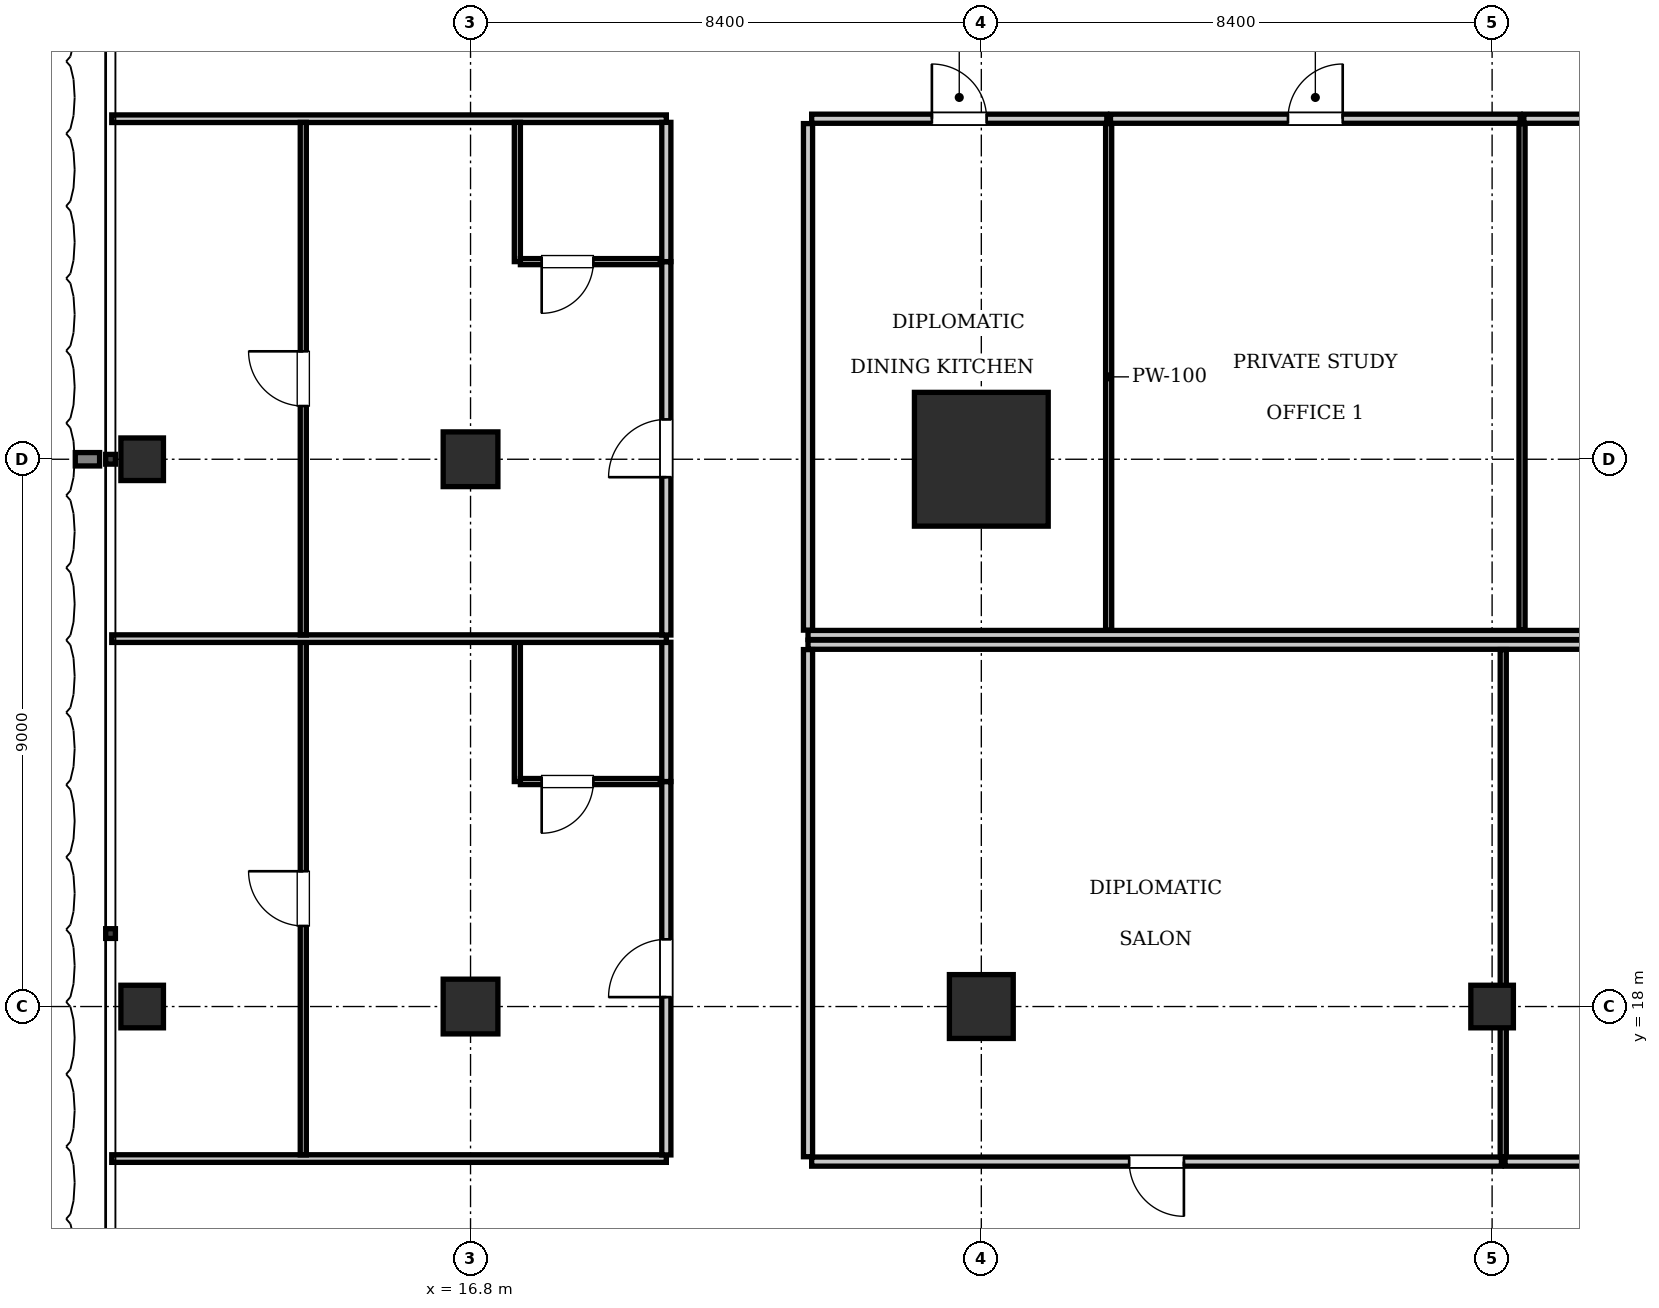
"""IFC4 building model, lengths in metres.
Left out: names, types, materials, properties, quantities, classifications, styles, units other than length and angle.
Written with IfcOpenShell. Run it as: python <this file> out.ifc"""

import sys

from ifc_helpers import new_model, si_unit, direction, frame, frame_2d, origin, origin_2d, place, context, subcontext, project, spatial, rectangle, i_section, extrude, element, fill, save


model = new_model("IFC4")
c1 = context("Model", 3, precision=1e-05, world=origin(), true_north=direction((0.0, 1.0)))
c2 = subcontext(c1, "Body", "Model", "MODEL_VIEW")
j1 = project(units=[si_unit("LENGTHUNIT", "METRE"), si_unit("PLANEANGLEUNIT", "RADIAN")], contexts=[c1])
p1 = place(None, origin())
s1 = spatial("IfcSite", under=j1, at=p1, CompositionType="ELEMENT")
p2 = place(p1, origin())
s2 = spatial("IfcBuilding", under=s1, at=p2, CompositionType="ELEMENT")
p3 = place(p2, frame((0.0, 0.0, 69.3)))
s3 = spatial("IfcBuildingStorey", under=s2, at=p3, CompositionType="ELEMENT", Elevation=69.3)
p4 = place(p3, frame((25.2, 27.0, 0.0), z_axis=(0.0, 0.0, 1.0), x_axis=(1.0, 0.0, 0.0)))
e1 = element("IfcColumn", 1, at=p4, inside=s3, PredefinedType="COLUMN", context=c2, shape_type="SweptSolid", body=[
    extrude(rectangle(XDim=2.2, YDim=2.2, at=origin_2d()), origin(), (0.0, 0.0, 1.0), 3.85),
])
p5 = place(p3, frame((25.2, 18.0, 0.0), z_axis=(0.0, 0.0, 1.0), x_axis=(1.0, 0.0, 0.0)))
e2 = element("IfcColumn", 2, at=p5, inside=s3, PredefinedType="COLUMN", context=c2, shape_type="SweptSolid", body=[
    extrude(rectangle(XDim=1.05, YDim=1.05, at=origin_2d()), origin(), (0.0, 0.0, 1.0), 3.85),
])
p6 = place(p3, frame((33.6, 18.0, 0.0), z_axis=(0.0, 0.0, 1.0), x_axis=(1.0, 0.0, 0.0)))
e3 = element("IfcColumn", 3, at=p6, inside=s3, PredefinedType="COLUMN", context=c2, shape_type="SweptSolid", body=[
    extrude(i_section(OverallWidth=0.7, OverallDepth=0.7, WebThickness=0.028, FlangeThickness=0.044, at=origin_2d()), origin(), (0.0, 0.0, 1.0), 3.85),
])
for number, where, z_axis, x_axis in (
    (4, (16.8, 18.0, 0.0), (0.0, 0.0, 1.0), (1.0, 0.0, 0.0)),
    (5, (16.8, 27.0, 0.0), (0.0, 0.0, 1.0), (1.0, 0.0, 0.0)),
):
    element("IfcColumn", number, at=place(p3, frame(where, z_axis=z_axis, x_axis=x_axis)), inside=s3, PredefinedType="COLUMN", context=c2, shape_type="SweptSolid", body=[
        extrude(rectangle(XDim=0.9, YDim=0.9, at=origin_2d()), origin(), (0.0, 0.0, 1.0), 3.85),
    ])
for number, where, z_axis, x_axis in (
    (6, (11.4, 18.0, 0.0), (0.0, 0.0, 1.0), (1.0, 0.0, 0.0)),
    (7, (11.4, 27.0, 0.0), (0.0, 0.0, 1.0), (1.0, 0.0, 0.0)),
):
    element("IfcColumn", number, at=place(p3, frame(where, z_axis=z_axis, x_axis=x_axis)), inside=s3, PredefinedType="COLUMN", context=c2, shape_type="SweptSolid", body=[
        extrude(i_section(OverallWidth=0.7, OverallDepth=0.7, WebThickness=0.028, FlangeThickness=0.044, at=origin_2d()), origin(), (0.0, 0.0, 1.0), 3.85),
    ])
p7 = place(p3, frame((22.35, 24.11, 0.0), z_axis=(0.0, 0.0, 1.0), x_axis=(1.0, 0.0, 0.0)))
e8 = element("IfcWall", 8, at=p7, inside=s3, PredefinedType="PARTITIONING", context=c2, shape_type="SweptSolid", body=[
    extrude(rectangle(XDim=30.9, YDim=0.15, at=frame_2d((15.45, 0.0))), origin(), (0.0, 0.0, 1.0), 3.61),
])
p8 = place(p3, frame((22.35, 24.19, 0.0), z_axis=(0.0, 0.0, 1.0), x_axis=(0.0, 1.0, 0.0)))
e9 = element("IfcWall", 9, at=p8, inside=s3, PredefinedType="PARTITIONING", context=c2, shape_type="SweptSolid", body=[
    extrude(rectangle(XDim=8.33, YDim=0.15, at=frame_2d((4.165, 0.0))), origin(), (0.0, 0.0, 1.0), 3.61),
])
p9 = place(p3, frame((22.41, 32.6, 0.0), z_axis=(0.0, 0.0, 1.0), x_axis=(1.0, 0.0, 0.0)))
e10 = element("IfcWall", 10, at=p9, inside=s3, PredefinedType="PARTITIONING", context=c2, shape_type="SweptSolid", body=[
    extrude(rectangle(XDim=4.854, YDim=0.15, at=frame_2d((2.427, 0.0))), origin(), (0.0, 0.0, 1.0), 3.61),
])
p10 = place(p9, frame((1.977, 0.0, 0.0)))
e11 = element("IfcOpeningElement", 11, at=p10, cuts=e10, PredefinedType="OPENING", context=c2, shape_type="SweptSolid", body=[
    extrude(rectangle(XDim=0.9, YDim=2.1, at=frame_2d((0.45, 1.05))), frame((0.0, 0.085, 0.0), z_axis=(0.0, -1.0, 0.0), x_axis=(1.0, 0.0, 0.0)), (0.0, 0.0, 1.0), 0.17),
])
p11 = place(p3, frame((27.294, 24.19, 0.0), z_axis=(0.0, 0.0, 1.0), x_axis=(0.0, 1.0, 0.0)))
e12 = element("IfcWall", 12, at=p11, inside=s3, PredefinedType="PARTITIONING", context=c2, shape_type="SweptSolid", body=[
    extrude(rectangle(XDim=8.33, YDim=0.1, at=frame_2d((4.165, 0.0))), origin(), (0.0, 0.0, 1.0), 3.61),
])
p12 = place(p3, frame((27.324, 32.6, 0.0), z_axis=(0.0, 0.0, 1.0), x_axis=(1.0, 0.0, 0.0)))
e13 = element("IfcWall", 13, at=p12, inside=s3, PredefinedType="PARTITIONING", context=c2, shape_type="SweptSolid", body=[
    extrude(rectangle(XDim=6.738, YDim=0.15, at=frame_2d((3.369, 0.0))), origin(), (0.0, 0.0, 1.0), 3.61),
])
p13 = place(p12, frame((2.919, 0.0, 0.0)))
e14 = element("IfcOpeningElement", 14, at=p13, cuts=e13, PredefinedType="OPENING", context=c2, shape_type="SweptSolid", body=[
    extrude(rectangle(XDim=0.9, YDim=2.1, at=frame_2d((0.45, 1.05))), frame((0.0, 0.085, 0.0), z_axis=(0.0, -1.0, 0.0), x_axis=(1.0, 0.0, 0.0)), (0.0, 0.0, 1.0), 0.17),
])
p14 = place(p3, frame((34.092, 24.19, 0.0), z_axis=(0.0, 0.0, 1.0), x_axis=(0.0, 1.0, 0.0)))
e15 = element("IfcWall", 15, at=p14, inside=s3, PredefinedType="PARTITIONING", context=c2, shape_type="SweptSolid", body=[
    extrude(rectangle(XDim=8.33, YDim=0.1, at=frame_2d((4.165, 0.0))), origin(), (0.0, 0.0, 1.0), 3.61),
])
p15 = place(p3, frame((34.122, 32.6, 0.0), z_axis=(0.0, 0.0, 1.0), x_axis=(1.0, 0.0, 0.0)))
e16 = element("IfcWall", 16, at=p15, inside=s3, PredefinedType="PARTITIONING", context=c2, shape_type="SweptSolid", body=[
    extrude(rectangle(XDim=8.592, YDim=0.15, at=frame_2d((4.296, 0.0))), origin(), (0.0, 0.0, 1.0), 3.61),
])
p16 = place(p15, frame((3.846, 0.0, 0.0)))
e17 = element("IfcOpeningElement", 17, at=p16, cuts=e16, PredefinedType="OPENING", context=c2, shape_type="SweptSolid", body=[
    extrude(rectangle(XDim=0.9, YDim=2.1, at=frame_2d((0.45, 1.05))), frame((0.0, 0.085, 0.0), z_axis=(0.0, -1.0, 0.0), x_axis=(1.0, 0.0, 0.0)), (0.0, 0.0, 1.0), 0.17),
])
p17 = place(p3, frame((22.35, 23.95, 0.0), z_axis=(0.0, 0.0, 1.0), x_axis=(1.0, 0.0, 0.0)))
e18 = element("IfcWall", 18, at=p17, inside=s3, PredefinedType="PARTITIONING", context=c2, shape_type="SweptSolid", body=[
    extrude(rectangle(XDim=30.9, YDim=0.15, at=frame_2d((15.45, 0.0))), origin(), (0.0, 0.0, 1.0), 3.61),
])
p18 = place(p3, frame((22.35, 15.53, 0.0), z_axis=(0.0, 0.0, 1.0), x_axis=(0.0, 1.0, 0.0)))
e19 = element("IfcWall", 19, at=p18, inside=s3, PredefinedType="PARTITIONING", context=c2, shape_type="SweptSolid", body=[
    extrude(rectangle(XDim=8.34, YDim=0.15, at=frame_2d((4.17, 0.0))), origin(), (0.0, 0.0, 1.0), 3.61),
])
p19 = place(p3, frame((22.41, 15.45, 0.0), z_axis=(0.0, 0.0, 1.0), x_axis=(1.0, 0.0, 0.0)))
e20 = element("IfcWall", 20, at=p19, inside=s3, PredefinedType="PARTITIONING", context=c2, shape_type="SweptSolid", body=[
    extrude(rectangle(XDim=11.343, YDim=0.15, at=frame_2d((5.671, 0.0))), origin(), (0.0, 0.0, 1.0), 3.61),
])
p20 = place(p19, frame((5.221, 0.0, 0.0)))
e21 = element("IfcOpeningElement", 21, at=p20, cuts=e20, PredefinedType="OPENING", context=c2, shape_type="SweptSolid", body=[
    extrude(rectangle(XDim=0.9, YDim=2.1, at=frame_2d((0.45, 1.05))), frame((0.0, 0.085, 0.0), z_axis=(0.0, -1.0, 0.0), x_axis=(1.0, 0.0, 0.0)), (0.0, 0.0, 1.0), 0.17),
])
p21 = place(p3, frame((33.783, 15.53, 0.0), z_axis=(0.0, 0.0, 1.0), x_axis=(0.0, 1.0, 0.0)))
e22 = element("IfcWall", 22, at=p21, inside=s3, PredefinedType="PARTITIONING", context=c2, shape_type="SweptSolid", body=[
    extrude(rectangle(XDim=8.34, YDim=0.1, at=frame_2d((4.17, 0.0))), origin(), (0.0, 0.0, 1.0), 2.988),
])
p22 = place(p3, frame((33.813, 15.45, 0.0), z_axis=(0.0, 0.0, 1.0), x_axis=(1.0, 0.0, 0.0)))
e23 = element("IfcWall", 23, at=p22, inside=s3, PredefinedType="PARTITIONING", context=c2, shape_type="SweptSolid", body=[
    extrude(rectangle(XDim=19.377, YDim=0.15, at=frame_2d((9.688, 0.0))), origin(), (0.0, 0.0, 1.0), 3.61),
])
p23 = place(p22, frame((9.239, 0.0, 0.0)))
e24 = element("IfcOpeningElement", 24, at=p23, cuts=e23, PredefinedType="OPENING", context=c2, shape_type="SweptSolid", body=[
    extrude(rectangle(XDim=0.9, YDim=2.1, at=frame_2d((0.45, 1.05))), frame((0.0, 0.085, 0.0), z_axis=(0.0, -1.0, 0.0), x_axis=(1.0, 0.0, 0.0)), (0.0, 0.0, 1.0), 0.17),
])
for number, where, z_axis, x_axis in (
    (25, (10.9, 15.5, 0.0), (0.0, 0.0, 1.0), (1.0, 0.0, 0.0)),
    (26, (10.9, 32.6, 0.0), (0.0, 0.0, 1.0), (1.0, 0.0, 0.0)),
):
    element("IfcWall", number, at=place(p3, frame(where, z_axis=z_axis, x_axis=x_axis)), inside=s3, PredefinedType="PARTITIONING", context=c2, shape_type="SweptSolid", body=[
        extrude(rectangle(XDim=9.12, YDim=0.125, at=frame_2d((4.56, 0.0))), origin(), (0.0, 0.0, 1.0), 3.61),
    ])
p24 = place(p3, frame((20.02, 15.56, 0.0), z_axis=(0.0, 0.0, 1.0), x_axis=(0.0, 1.0, 0.0)))
e27 = element("IfcWall", 27, at=p24, inside=s3, PredefinedType="PARTITIONING", context=c2, shape_type="SweptSolid", body=[
    extrude(rectangle(XDim=6.14, YDim=0.15, at=frame_2d((3.07, 0.0))), origin(), (0.0, 0.0, 1.0), 3.61),
])
p25 = place(p24, frame((2.595, 0.0, 0.0)))
e28 = element("IfcOpeningElement", 28, at=p25, cuts=e27, PredefinedType="OPENING", context=c2, shape_type="SweptSolid", body=[
    extrude(rectangle(XDim=0.95, YDim=2.15, at=frame_2d((0.475, 1.075))), frame((0.0, 0.085, 0.0), z_axis=(0.0, -1.0, 0.0), x_axis=(1.0, 0.0, 0.0)), (0.0, 0.0, 1.0), 0.17),
])
p26 = place(p3, frame((20.02, 21.7, 0.0), z_axis=(0.0, 0.0, 1.0), x_axis=(0.0, 1.0, 0.0)))
e29 = element("IfcWall", 29, at=p26, inside=s3, PredefinedType="PARTITIONING", context=c2, shape_type="SweptSolid", body=[
    extrude(rectangle(XDim=2.29, YDim=0.15, at=frame_2d((1.145, 0.0))), origin(), (0.0, 0.0, 1.0), 3.61),
])
p27 = place(p3, frame((17.57, 21.7, 0.0), z_axis=(0.0, 0.0, 1.0), x_axis=(0.0, 1.0, 0.0)))
e30 = element("IfcWall", 30, at=p27, inside=s3, PredefinedType="PARTITIONING", context=c2, shape_type="SweptSolid", body=[
    extrude(rectangle(XDim=2.29, YDim=0.1, at=frame_2d((1.145, 0.0))), origin(), (0.0, 0.0, 1.0), 3.61),
])
p28 = place(p3, frame((17.62, 21.7, 0.0), z_axis=(0.0, 0.0, 1.0), x_axis=(1.0, 0.0, 0.0)))
e31 = element("IfcWall", 31, at=p28, inside=s3, PredefinedType="PARTITIONING", context=c2, shape_type="SweptSolid", body=[
    extrude(rectangle(XDim=2.3, YDim=0.1, at=frame_2d((1.15, 0.0))), origin(), (0.0, 0.0, 1.0), 3.61),
])
p29 = place(p28, frame((0.35, 0.0, 0.0)))
e32 = element("IfcOpeningElement", 32, at=p29, cuts=e31, PredefinedType="OPENING", context=c2, shape_type="SweptSolid", body=[
    extrude(rectangle(XDim=0.85, YDim=2.1, at=frame_2d((0.425, 1.05))), frame((0.0, 0.06, 0.0), z_axis=(0.0, -1.0, 0.0), x_axis=(1.0, 0.0, 0.0)), (0.0, 0.0, 1.0), 0.12),
])
p30 = place(p3, frame((14.05, 15.56, 0.0), z_axis=(0.0, 0.0, 1.0), x_axis=(0.0, 1.0, 0.0)))
e33 = element("IfcWall", 33, at=p30, inside=s3, PredefinedType="PARTITIONING", context=c2, shape_type="SweptSolid", body=[
    extrude(rectangle(XDim=8.43, YDim=0.1, at=frame_2d((4.215, 0.0))), origin(), (0.0, 0.0, 1.0), 3.403),
])
p31 = place(p30, frame((3.765, 0.0, 0.0)))
e34 = element("IfcOpeningElement", 34, at=p31, cuts=e33, PredefinedType="OPENING", context=c2, shape_type="SweptSolid", body=[
    extrude(rectangle(XDim=0.9, YDim=2.1, at=frame_2d((0.45, 1.05))), frame((0.0, 0.06, 0.0), z_axis=(0.0, -1.0, 0.0), x_axis=(1.0, 0.0, 0.0)), (0.0, 0.0, 1.0), 0.12),
])
p32 = place(p3, frame((10.9, 24.05, 0.0), z_axis=(0.0, 0.0, 1.0), x_axis=(1.0, 0.0, 0.0)))
e35 = element("IfcWall", 35, at=p32, inside=s3, PredefinedType="PARTITIONING", context=c2, shape_type="SweptSolid", body=[
    extrude(rectangle(XDim=9.12, YDim=0.125, at=frame_2d((4.56, 0.0))), origin(), (0.0, 0.0, 1.0), 3.61),
])
p33 = place(p3, frame((20.02, 24.11, 0.0), z_axis=(0.0, 0.0, 1.0), x_axis=(0.0, 1.0, 0.0)))
e36 = element("IfcWall", 36, at=p33, inside=s3, PredefinedType="PARTITIONING", context=c2, shape_type="SweptSolid", body=[
    extrude(rectangle(XDim=6.14, YDim=0.15, at=frame_2d((3.07, 0.0))), origin(), (0.0, 0.0, 1.0), 3.61),
])
p34 = place(p33, frame((2.595, 0.0, 0.0)))
e37 = element("IfcOpeningElement", 37, at=p34, cuts=e36, PredefinedType="OPENING", context=c2, shape_type="SweptSolid", body=[
    extrude(rectangle(XDim=0.95, YDim=2.15, at=frame_2d((0.475, 1.075))), frame((0.0, 0.085, 0.0), z_axis=(0.0, -1.0, 0.0), x_axis=(1.0, 0.0, 0.0)), (0.0, 0.0, 1.0), 0.17),
])
p35 = place(p3, frame((20.02, 30.25, 0.0), z_axis=(0.0, 0.0, 1.0), x_axis=(0.0, 1.0, 0.0)))
e38 = element("IfcWall", 38, at=p35, inside=s3, PredefinedType="PARTITIONING", context=c2, shape_type="SweptSolid", body=[
    extrude(rectangle(XDim=2.29, YDim=0.15, at=frame_2d((1.145, 0.0))), origin(), (0.0, 0.0, 1.0), 3.61),
])
p36 = place(p3, frame((17.57, 30.25, 0.0), z_axis=(0.0, 0.0, 1.0), x_axis=(0.0, 1.0, 0.0)))
e39 = element("IfcWall", 39, at=p36, inside=s3, PredefinedType="PARTITIONING", context=c2, shape_type="SweptSolid", body=[
    extrude(rectangle(XDim=2.29, YDim=0.1, at=frame_2d((1.145, 0.0))), origin(), (0.0, 0.0, 1.0), 3.61),
])
p37 = place(p3, frame((17.62, 30.25, 0.0), z_axis=(0.0, 0.0, 1.0), x_axis=(1.0, 0.0, 0.0)))
e40 = element("IfcWall", 40, at=p37, inside=s3, PredefinedType="PARTITIONING", context=c2, shape_type="SweptSolid", body=[
    extrude(rectangle(XDim=2.3, YDim=0.1, at=frame_2d((1.15, 0.0))), origin(), (0.0, 0.0, 1.0), 3.61),
])
p38 = place(p37, frame((0.35, 0.0, 0.0)))
e41 = element("IfcOpeningElement", 41, at=p38, cuts=e40, PredefinedType="OPENING", context=c2, shape_type="SweptSolid", body=[
    extrude(rectangle(XDim=0.85, YDim=2.1, at=frame_2d((0.425, 1.05))), frame((0.0, 0.06, 0.0), z_axis=(0.0, -1.0, 0.0), x_axis=(1.0, 0.0, 0.0)), (0.0, 0.0, 1.0), 0.12),
])
p39 = place(p3, frame((14.05, 24.11, 0.0), z_axis=(0.0, 0.0, 1.0), x_axis=(0.0, 1.0, 0.0)))
e42 = element("IfcWall", 42, at=p39, inside=s3, PredefinedType="PARTITIONING", context=c2, shape_type="SweptSolid", body=[
    extrude(rectangle(XDim=8.43, YDim=0.1, at=frame_2d((4.215, 0.0))), origin(), (0.0, 0.0, 1.0), 3.207),
])
p40 = place(p39, frame((3.765, 0.0, 0.0)))
e43 = element("IfcOpeningElement", 43, at=p40, cuts=e42, PredefinedType="OPENING", context=c2, shape_type="SweptSolid", body=[
    extrude(rectangle(XDim=0.9, YDim=2.1, at=frame_2d((0.45, 1.05))), frame((0.0, 0.06, 0.0), z_axis=(0.0, -1.0, 0.0), x_axis=(1.0, 0.0, 0.0)), (0.0, 0.0, 1.0), 0.12),
])
p41 = place(p10, origin())
e44 = element("IfcDoor", 44, at=p41, inside=s3, OperationType="SINGLE_SWING_LEFT", PredefinedType="DOOR", context=c2, shape_type="SweptSolid", body=[
    extrude(rectangle(XDim=0.9, YDim=2.1, at=frame_2d((0.45, 1.05))), frame((0.0, 0.025, 0.0), z_axis=(0.0, -1.0, 0.0), x_axis=(1.0, 0.0, 0.0)), (0.0, 0.0, 1.0), 0.05),
])
fill(e11, e44)
p42 = place(p13, origin())
e45 = element("IfcDoor", 45, at=p42, inside=s3, OperationType="SINGLE_SWING_RIGHT", PredefinedType="DOOR", context=c2, shape_type="SweptSolid", body=[
    extrude(rectangle(XDim=0.9, YDim=2.1, at=frame_2d((0.45, 1.05))), frame((0.0, 0.025, 0.0), z_axis=(0.0, -1.0, 0.0), x_axis=(1.0, 0.0, 0.0)), (0.0, 0.0, 1.0), 0.05),
])
fill(e14, e45)
p43 = place(p20, frame((0.9, 0.0, 0.0), z_axis=(0.0, 0.0, 1.0), x_axis=(-1.0, 0.0, 0.0)))
e46 = element("IfcDoor", 46, at=p43, inside=s3, OperationType="SINGLE_SWING_LEFT", PredefinedType="DOOR", context=c2, shape_type="SweptSolid", body=[
    extrude(rectangle(XDim=0.9, YDim=2.1, at=frame_2d((0.45, 1.05))), frame((0.0, 0.025, 0.0), z_axis=(0.0, -1.0, 0.0), x_axis=(1.0, 0.0, 0.0)), (0.0, 0.0, 1.0), 0.05),
])
fill(e21, e46)
p44 = place(p29, frame((0.85, 0.0, 0.0), z_axis=(0.0, 0.0, 1.0), x_axis=(-1.0, 0.0, 0.0)))
e47 = element("IfcDoor", 47, at=p44, inside=s3, OperationType="SINGLE_SWING_RIGHT", PredefinedType="DOOR", context=c2, shape_type="SweptSolid", body=[
    extrude(rectangle(XDim=0.85, YDim=2.1, at=frame_2d((0.425, 1.05))), frame((0.0, 0.025, 0.0), z_axis=(0.0, -1.0, 0.0), x_axis=(1.0, 0.0, 0.0)), (0.0, 0.0, 1.0), 0.05),
])
fill(e32, e47)
p45 = place(p25, origin())
e48 = element("IfcDoor", 48, at=p45, inside=s3, OperationType="SINGLE_SWING_LEFT", PredefinedType="DOOR", context=c2, shape_type="SweptSolid", body=[
    extrude(rectangle(XDim=0.95, YDim=2.15, at=frame_2d((0.475, 1.075))), frame((0.0, 0.025, 0.0), z_axis=(0.0, -1.0, 0.0), x_axis=(1.0, 0.0, 0.0)), (0.0, 0.0, 1.0), 0.05),
])
fill(e28, e48)
p46 = place(p31, origin())
e49 = element("IfcDoor", 49, at=p46, inside=s3, OperationType="SINGLE_SWING_RIGHT", PredefinedType="DOOR", context=c2, shape_type="SweptSolid", body=[
    extrude(rectangle(XDim=0.9, YDim=2.1, at=frame_2d((0.45, 1.05))), frame((0.0, 0.025, 0.0), z_axis=(0.0, -1.0, 0.0), x_axis=(1.0, 0.0, 0.0)), (0.0, 0.0, 1.0), 0.05),
])
fill(e34, e49)
p47 = place(p38, frame((0.85, 0.0, 0.0), z_axis=(0.0, 0.0, 1.0), x_axis=(-1.0, 0.0, 0.0)))
e50 = element("IfcDoor", 50, at=p47, inside=s3, OperationType="SINGLE_SWING_RIGHT", PredefinedType="DOOR", context=c2, shape_type="SweptSolid", body=[
    extrude(rectangle(XDim=0.85, YDim=2.1, at=frame_2d((0.425, 1.05))), frame((0.0, 0.025, 0.0), z_axis=(0.0, -1.0, 0.0), x_axis=(1.0, 0.0, 0.0)), (0.0, 0.0, 1.0), 0.05),
])
fill(e41, e50)
p48 = place(p34, origin())
e51 = element("IfcDoor", 51, at=p48, inside=s3, OperationType="SINGLE_SWING_LEFT", PredefinedType="DOOR", context=c2, shape_type="SweptSolid", body=[
    extrude(rectangle(XDim=0.95, YDim=2.15, at=frame_2d((0.475, 1.075))), frame((0.0, 0.025, 0.0), z_axis=(0.0, -1.0, 0.0), x_axis=(1.0, 0.0, 0.0)), (0.0, 0.0, 1.0), 0.05),
])
fill(e37, e51)
p49 = place(p40, origin())
e52 = element("IfcDoor", 52, at=p49, inside=s3, OperationType="SINGLE_SWING_RIGHT", PredefinedType="DOOR", context=c2, shape_type="SweptSolid", body=[
    extrude(rectangle(XDim=0.9, YDim=2.1, at=frame_2d((0.45, 1.05))), frame((0.0, 0.025, 0.0), z_axis=(0.0, -1.0, 0.0), x_axis=(1.0, 0.0, 0.0)), (0.0, 0.0, 1.0), 0.05),
])
fill(e43, e52)
save(model, sys.argv[1])
